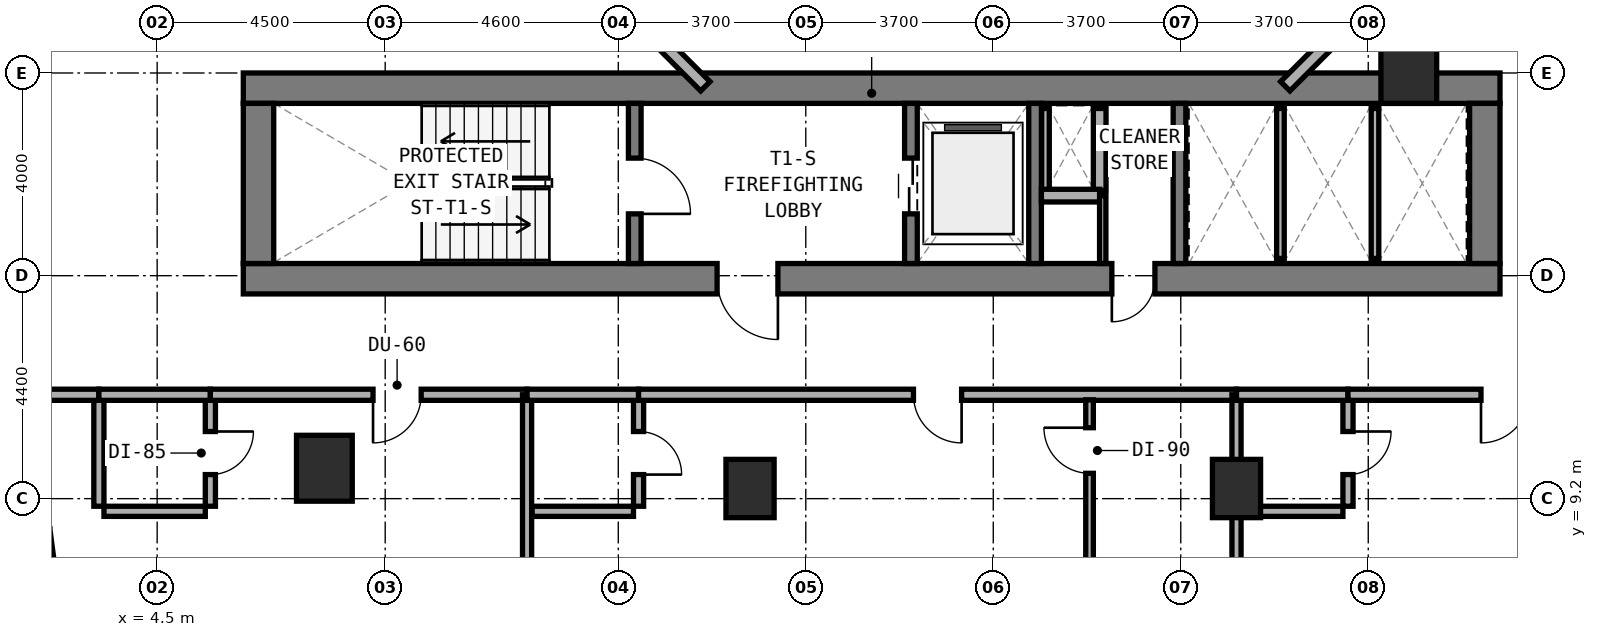
"""IFC4 building model, lengths in metres.
Left out: names, types, materials, properties, quantities, classifications, styles, units other than length and angle.
Written with IfcOpenShell. Run it as: python <this file> out.ifc"""

import sys

from ifc_helpers import new_model, si_unit, direction, frame, frame_2d, origin, origin_2d, place, context, subcontext, project, spatial, rectangle, extrude, element, fill, save


model = new_model("IFC4")
c1 = context("Model", 3, precision=1e-05, world=origin(), true_north=direction((0.0, 1.0)))
c2 = subcontext(c1, "Body", "Model", "MODEL_VIEW")
j1 = project(units=[si_unit("LENGTHUNIT", "METRE"), si_unit("PLANEANGLEUNIT", "RADIAN")], contexts=[c1])
p1 = place(None, origin())
s1 = spatial("IfcSite", under=j1, at=p1, CompositionType="ELEMENT")
p2 = place(p1, origin())
s2 = spatial("IfcBuilding", under=s1, at=p2, CompositionType="ELEMENT")
p3 = place(p2, frame((0.0, 0.0, 48.5)))
s3 = spatial("IfcBuildingStorey", under=s2, at=p3, CompositionType="ELEMENT", Elevation=48.5)
p4 = place(p3, frame((6.2, 13.54, 0.0), z_axis=(0.0, 0.0, 1.0), x_axis=(1.0, 0.0, 0.0)))
e1 = element("IfcWall", 1, at=p4, inside=s3, PredefinedType="SHEAR", context=c2, shape_type="SweptSolid", body=[
    extrude(rectangle(XDim=24.8, YDim=0.6, at=frame_2d((12.4, 0.0))), origin(), (0.0, 0.0, 1.0), 3.5),
])
p5 = place(p4, frame((9.35, 0.0, 0.0)))
e2 = element("IfcOpeningElement", 2, at=p5, cuts=e1, PredefinedType="OPENING", context=c2, shape_type="SweptSolid", body=[
    extrude(rectangle(XDim=1.2, YDim=2.15, at=frame_2d((0.6, 1.075))), frame((0.0, 0.31, 0.0), z_axis=(0.0, -1.0, 0.0), x_axis=(1.0, 0.0, 0.0)), (0.0, 0.0, 1.0), 0.62),
])
p6 = place(p4, frame((17.14, 0.0, 0.0)))
e3 = element("IfcOpeningElement", 3, at=p6, cuts=e1, PredefinedType="OPENING", context=c2, shape_type="SweptSolid", body=[
    extrude(rectangle(XDim=0.85, YDim=2.1, at=frame_2d((0.425, 1.05))), frame((0.0, 0.31, 0.0), z_axis=(0.0, -1.0, 0.0), x_axis=(1.0, 0.0, 0.0)), (0.0, 0.0, 1.0), 0.62),
])
p7 = place(p3, frame((6.2, 17.3, 0.0), z_axis=(0.0, 0.0, 1.0), x_axis=(1.0, 0.0, 0.0)))
e4 = element("IfcWall", 4, at=p7, inside=s3, PredefinedType="SHEAR", context=c2, shape_type="SweptSolid", body=[
    extrude(rectangle(XDim=24.8, YDim=0.6, at=frame_2d((12.4, 0.0))), origin(), (0.0, 0.0, 1.0), 3.5),
])
for number, where, z_axis, x_axis in (
    (5, (6.5, 13.84, 0.0), (0.0, 0.0, 1.0), (0.0, 1.0, 0.0)),
    (6, (30.7, 13.84, 0.0), (0.0, 0.0, 1.0), (0.0, 1.0, 0.0)),
):
    element("IfcWall", number, at=place(p3, frame(where, z_axis=z_axis, x_axis=x_axis)), inside=s3, PredefinedType="SHEAR", context=c2, shape_type="SweptSolid", body=[
        extrude(rectangle(XDim=3.16, YDim=0.6, at=frame_2d((1.58, 0.0))), origin(), (0.0, 0.0, 1.0), 3.5),
    ])
p8 = place(p3, frame((13.925, 13.84, 0.0), z_axis=(0.0, 0.0, 1.0), x_axis=(0.0, 1.0, 0.0)))
e7 = element("IfcWall", 7, at=p8, inside=s3, PredefinedType="STANDARD", context=c2, shape_type="SweptSolid", body=[
    extrude(rectangle(XDim=3.16, YDim=0.25, at=frame_2d((1.58, 0.0))), origin(), (0.0, 0.0, 1.0), 3.22),
])
p9 = place(p8, frame((0.98, 0.0, 0.0)))
e8 = element("IfcOpeningElement", 8, at=p9, cuts=e7, PredefinedType="OPENING", context=c2, shape_type="SweptSolid", body=[
    extrude(rectangle(XDim=1.1, YDim=2.15, at=frame_2d((0.55, 1.075))), frame((0.0, 0.135, 0.0), z_axis=(0.0, -1.0, 0.0), x_axis=(1.0, 0.0, 0.0)), (0.0, 0.0, 1.0), 0.27),
])
p10 = place(p3, frame((19.375, 13.84, 0.0), z_axis=(0.0, 0.0, 1.0), x_axis=(0.0, 1.0, 0.0)))
e9 = element("IfcWall", 9, at=p10, inside=s3, PredefinedType="STANDARD", context=c2, shape_type="SweptSolid", body=[
    extrude(rectangle(XDim=3.16, YDim=0.25, at=frame_2d((1.58, 0.0))), origin(), (0.0, 0.0, 1.0), 3.22),
])
p11 = place(p10, frame((0.98, 0.0, 0.0)))
e10 = element("IfcOpeningElement", 10, at=p11, cuts=e9, PredefinedType="OPENING", context=c2, shape_type="SweptSolid", body=[
    extrude(rectangle(XDim=1.1, YDim=2.15, at=frame_2d((0.55, 1.075))), frame((0.0, 0.135, 0.0), z_axis=(0.0, -1.0, 0.0), x_axis=(1.0, 0.0, 0.0)), (0.0, 0.0, 1.0), 0.27),
])
for number, where, z_axis, x_axis in (
    (11, (21.825, 13.84, 0.0), (0.0, 0.0, 1.0), (0.0, 1.0, 0.0)),
    (12, (24.675, 13.84, 0.0), (0.0, 0.0, 1.0), (0.0, 1.0, 0.0)),
):
    element("IfcWall", number, at=place(p3, frame(where, z_axis=z_axis, x_axis=x_axis)), inside=s3, PredefinedType="STANDARD", context=c2, shape_type="SweptSolid", body=[
        extrude(rectangle(XDim=3.16, YDim=0.25, at=frame_2d((1.58, 0.0))), origin(), (0.0, 0.0, 1.0), 3.22),
    ])
for number, where, z_axis, x_axis in (
    (13, (16.2, 9.4, 0.0), (0.0, 0.0, 1.0), (1.0, 0.0, 0.0)),
    (14, (25.8, 9.4, 0.0), (0.0, 0.0, 1.0), (1.0, 0.0, 0.0)),
):
    element("IfcColumn", number, at=place(p3, frame(where, z_axis=z_axis, x_axis=x_axis)), inside=s3, PredefinedType="COLUMN", context=c2, shape_type="SweptSolid", body=[
        extrude(rectangle(XDim=0.95, YDim=1.15, at=origin_2d()), origin(), (0.0, 0.0, 1.0), 3.5),
    ])
for number, where, z_axis, x_axis in (
    (15, (7.8, 9.8, 0.0), (0.0, 0.0, 1.0), (1.0, 0.0, 0.0)),
    (16, (29.2, 17.65, 0.0), (0.0, 0.0, 1.0), (1.0, 0.0, 0.0)),
):
    element("IfcColumn", number, at=place(p3, frame(where, z_axis=z_axis, x_axis=x_axis)), inside=s3, PredefinedType="COLUMN", context=c2, shape_type="SweptSolid", body=[
        extrude(rectangle(XDim=1.1, YDim=1.3, at=origin_2d()), origin(), (0.0, 0.0, 1.0), 3.5),
    ])
p12 = place(p3, frame((2.228, 8.628, 0.0), z_axis=(0.0, 0.0, 1.0), x_axis=(0.131174864804, -0.991359246108, 0.0)))
e17 = element("IfcWall", 17, at=p12, inside=s3, PredefinedType="STANDARD", context=c2, shape_type="SweptSolid", body=[
    extrude(rectangle(XDim=0.938, YDim=0.3, at=frame_2d((0.469, 0.0))), origin(), (0.0, 0.0, 1.0), 3.22),
])
p13 = place(p3, frame((26.762, 17.338, 0.0), z_axis=(0.0, 0.0, 1.0), x_axis=(0.707059717605, 0.707153841636, 0.0)))
e18 = element("IfcWall", 18, at=p13, inside=s3, PredefinedType="STANDARD", context=c2, shape_type="SweptSolid", body=[
    extrude(rectangle(XDim=2.594, YDim=0.26, at=frame_2d((1.297, 0.0))), origin(), (0.0, 0.0, 1.0), 3.22),
])
p14 = place(p3, frame((13.484, 19.172, 0.0), z_axis=(0.0, 0.0, 1.0), x_axis=(0.707106781187, -0.707106781187, 0.0)))
e19 = element("IfcWall", 19, at=p14, inside=s3, PredefinedType="STANDARD", context=c2, shape_type="SweptSolid", body=[
    extrude(rectangle(XDim=2.594, YDim=0.26, at=frame_2d((1.297, 0.0))), origin(), (0.0, 0.0, 1.0), 3.22),
])
p15 = place(p3, frame((22.03, 15.28, 0.0), z_axis=(0.0, 0.0, 1.0), x_axis=(0.0, 1.0, 0.0)))
e20 = element("IfcWall", 20, at=p15, inside=s3, PredefinedType="PARTITIONING", context=c2, shape_type="SweptSolid", body=[
    extrude(rectangle(XDim=1.62, YDim=0.15, at=frame_2d((0.81, 0.0))), origin(), (0.0, 0.0, 1.0), 3.22),
])
p16 = place(p3, frame((23.1, 15.28, 0.0), z_axis=(0.0, 0.0, 1.0), x_axis=(0.0, 1.0, 0.0)))
e21 = element("IfcWall", 21, at=p16, inside=s3, PredefinedType="SOLIDWALL", context=c2, shape_type="SweptSolid", body=[
    extrude(rectangle(XDim=1.62, YDim=0.25, at=frame_2d((0.81, 0.0))), origin(), (0.0, 0.0, 1.0), 3.22),
])
p17 = place(p3, frame((21.95, 15.18, 0.0), z_axis=(0.0, 0.0, 1.0), x_axis=(1.0, 0.0, 0.0)))
e22 = element("IfcWall", 22, at=p17, inside=s3, PredefinedType="SOLIDWALL", context=c2, shape_type="SweptSolid", body=[
    extrude(rectangle(XDim=1.15, YDim=0.25, at=frame_2d((0.575, 0.0))), origin(), (0.0, 0.0, 1.0), 3.22),
])
p18 = place(p3, frame((23.16, 13.84, 0.0), z_axis=(0.0, 0.0, 1.0), x_axis=(0.0, 1.0, 0.0)))
e23 = element("IfcWall", 23, at=p18, inside=s3, PredefinedType="PARTITIONING", context=c2, shape_type="SweptSolid", body=[
    extrude(rectangle(XDim=1.34, YDim=0.125, at=frame_2d((0.67, 0.0))), origin(), (0.0, 0.0, 1.0), 3.22),
])
p19 = place(p3, frame((26.667, 13.94, 0.0), z_axis=(0.0, 0.0, 1.0), x_axis=(0.0, 1.0, 0.0)))
e24 = element("IfcWall", 24, at=p19, inside=s3, PredefinedType="PARTITIONING", context=c2, shape_type="SweptSolid", body=[
    extrude(rectangle(XDim=2.96, YDim=0.15, at=frame_2d((1.48, 0.0))), origin(), (0.0, 0.0, 1.0), 3.22),
])
p20 = place(p3, frame((28.533, 13.94, 0.0), z_axis=(0.0, 0.0, 1.0), x_axis=(0.0, 1.0, 0.0)))
e25 = element("IfcWall", 25, at=p20, inside=s3, PredefinedType="PARTITIONING", context=c2, shape_type="SweptSolid", body=[
    extrude(rectangle(XDim=2.96, YDim=0.15, at=frame_2d((1.48, 0.0))), origin(), (0.0, 0.0, 1.0), 2.395),
])
p21 = place(p3, frame((5.55, 9.05, 0.0), z_axis=(0.0, 0.0, 1.0), x_axis=(0.0, 1.0, 0.0)))
e26 = element("IfcWall", 26, at=p21, inside=s3, PredefinedType="PLUMBINGWALL", context=c2, shape_type="SweptSolid", body=[
    extrude(rectangle(XDim=2.1, YDim=0.2, at=frame_2d((1.05, 0.0))), origin(), (0.0, 0.0, 1.0), 3.22),
])
p22 = place(p21, frame((0.625, 0.0, 0.0)))
e27 = element("IfcOpeningElement", 27, at=p22, cuts=e26, PredefinedType="OPENING", context=c2, shape_type="SweptSolid", body=[
    extrude(rectangle(XDim=0.85, YDim=2.1, at=frame_2d((0.425, 1.05))), frame((0.0, 0.11, 0.0), z_axis=(0.0, -1.0, 0.0), x_axis=(1.0, 0.0, 0.0)), (0.0, 0.0, 1.0), 0.22),
])
p23 = place(p3, frame((3.45, 8.95, 0.0), z_axis=(0.0, 0.0, 1.0), x_axis=(1.0, 0.0, 0.0)))
e28 = element("IfcWall", 28, at=p23, inside=s3, PredefinedType="PLUMBINGWALL", context=c2, shape_type="SweptSolid", body=[
    extrude(rectangle(XDim=2.0, YDim=0.2, at=frame_2d((1.0, 0.0))), origin(), (0.0, 0.0, 1.0), 3.22),
])
p24 = place(p3, frame((3.35, 9.05, 0.0), z_axis=(0.0, 0.0, 1.0), x_axis=(0.0, 1.0, 0.0)))
e29 = element("IfcWall", 29, at=p24, inside=s3, PredefinedType="PLUMBINGWALL", context=c2, shape_type="SweptSolid", body=[
    extrude(rectangle(XDim=2.1, YDim=0.2, at=frame_2d((1.05, 0.0))), origin(), (0.0, 0.0, 1.0), 3.22),
])
p25 = place(p3, frame((0.24, 11.25, 0.0), z_axis=(0.0, 0.0, 1.0), x_axis=(1.0, 0.0, 0.0)))
e30 = element("IfcWall", 30, at=p25, inside=s3, PredefinedType="SOLIDWALL", context=c2, shape_type="SweptSolid", body=[
    extrude(rectangle(XDim=3.11, YDim=0.22, at=frame_2d((1.555, 0.0))), origin(), (0.0, 0.0, 1.0), 3.22),
])
p26 = place(p3, frame((3.35, 11.25, 0.0), z_axis=(0.0, 0.0, 1.0), x_axis=(1.0, 0.0, 0.0)))
e31 = element("IfcWall", 31, at=p26, inside=s3, PredefinedType="SOLIDWALL", context=c2, shape_type="SweptSolid", body=[
    extrude(rectangle(XDim=2.2, YDim=0.22, at=frame_2d((1.1, 0.0))), origin(), (0.0, 0.0, 1.0), 3.22),
])
p27 = place(p3, frame((5.55, 11.25, 0.0), z_axis=(0.0, 0.0, 1.0), x_axis=(1.0, 0.0, 0.0)))
e32 = element("IfcWall", 32, at=p27, inside=s3, PredefinedType="SOLIDWALL", context=c2, shape_type="SweptSolid", body=[
    extrude(rectangle(XDim=6.25, YDim=0.22, at=frame_2d((3.125, 0.0))), origin(), (0.0, 0.0, 1.0), 2.395),
])
p28 = place(p27, frame((3.21, 0.0, 0.0)))
e33 = element("IfcOpeningElement", 33, at=p28, cuts=e32, PredefinedType="OPENING", context=c2, shape_type="SweptSolid", body=[
    extrude(rectangle(XDim=0.95, YDim=2.1, at=frame_2d((0.475, 1.05))), frame((0.0, 0.12, 0.0), z_axis=(0.0, -1.0, 0.0), x_axis=(1.0, 0.0, 0.0)), (0.0, 0.0, 1.0), 0.24),
])
p29 = place(p3, frame((11.8, 3.712, 0.0), z_axis=(0.0, 0.0, 1.0), x_axis=(0.0, 1.0, 0.0)))
e34 = element("IfcWall", 34, at=p29, inside=s3, PredefinedType="SOLIDWALL", context=c2, shape_type="SweptSolid", body=[
    extrude(rectangle(XDim=7.538, YDim=0.18, at=frame_2d((3.769, 0.0))), origin(), (0.0, 0.0, 1.0), 2.745),
])
p30 = place(p3, frame((14.0, 9.05, 0.0), z_axis=(0.0, 0.0, 1.0), x_axis=(0.0, 1.0, 0.0)))
e35 = element("IfcWall", 35, at=p30, inside=s3, PredefinedType="PLUMBINGWALL", context=c2, shape_type="SweptSolid", body=[
    extrude(rectangle(XDim=2.1, YDim=0.2, at=frame_2d((1.05, 0.0))), origin(), (0.0, 0.0, 1.0), 2.745),
])
p31 = place(p30, frame((0.625, 0.0, 0.0)))
e36 = element("IfcOpeningElement", 36, at=p31, cuts=e35, PredefinedType="OPENING", context=c2, shape_type="SweptSolid", body=[
    extrude(rectangle(XDim=0.85, YDim=2.1, at=frame_2d((0.425, 1.05))), frame((0.0, 0.11, 0.0), z_axis=(0.0, -1.0, 0.0), x_axis=(1.0, 0.0, 0.0)), (0.0, 0.0, 1.0), 0.22),
])
p32 = place(p3, frame((11.9, 8.95, 0.0), z_axis=(0.0, 0.0, 1.0), x_axis=(1.0, 0.0, 0.0)))
e37 = element("IfcWall", 37, at=p32, inside=s3, PredefinedType="PLUMBINGWALL", context=c2, shape_type="SweptSolid", body=[
    extrude(rectangle(XDim=2.0, YDim=0.2, at=frame_2d((1.0, 0.0))), origin(), (0.0, 0.0, 1.0), 3.22),
])
p33 = place(p3, frame((11.8, 11.25, 0.0), z_axis=(0.0, 0.0, 1.0), x_axis=(1.0, 0.0, 0.0)))
e38 = element("IfcWall", 38, at=p33, inside=s3, PredefinedType="SOLIDWALL", context=c2, shape_type="SweptSolid", body=[
    extrude(rectangle(XDim=2.2, YDim=0.22, at=frame_2d((1.1, 0.0))), origin(), (0.0, 0.0, 1.0), 2.955),
])
p34 = place(p3, frame((14.0, 11.25, 0.0), z_axis=(0.0, 0.0, 1.0), x_axis=(1.0, 0.0, 0.0)))
e39 = element("IfcWall", 39, at=p34, inside=s3, PredefinedType="SOLIDWALL", context=c2, shape_type="SweptSolid", body=[
    extrude(rectangle(XDim=11.8, YDim=0.22, at=frame_2d((5.9, 0.0))), origin(), (0.0, 0.0, 1.0), 2.395),
])
p35 = place(p34, frame((5.425, 0.0, 0.0)))
e40 = element("IfcOpeningElement", 40, at=p35, cuts=e39, PredefinedType="OPENING", context=c2, shape_type="SweptSolid", body=[
    extrude(rectangle(XDim=0.95, YDim=2.1, at=frame_2d((0.475, 1.05))), frame((0.0, 0.12, 0.0), z_axis=(0.0, -1.0, 0.0), x_axis=(1.0, 0.0, 0.0)), (0.0, 0.0, 1.0), 0.24),
])
p36 = place(p3, frame((22.9, 3.16, 0.0), z_axis=(0.0, 0.0, 1.0), x_axis=(0.0, 1.0, 0.0)))
e41 = element("IfcWall", 41, at=p36, inside=s3, PredefinedType="PARTITIONING", context=c2, shape_type="SweptSolid", body=[
    extrude(rectangle(XDim=7.99, YDim=0.15, at=frame_2d((3.995, 0.0))), origin(), (0.0, 0.0, 1.0), 2.745),
])
p37 = place(p36, frame((6.54, 0.0, 0.0)))
e42 = element("IfcOpeningElement", 42, at=p37, cuts=e41, PredefinedType="OPENING", context=c2, shape_type="SweptSolid", body=[
    extrude(rectangle(XDim=0.9, YDim=2.1, at=frame_2d((0.45, 1.05))), frame((0.0, 0.085, 0.0), z_axis=(0.0, -1.0, 0.0), x_axis=(1.0, 0.0, 0.0)), (0.0, 0.0, 1.0), 0.17),
])
p38 = place(p3, frame((25.8, 3.06, 0.0), z_axis=(0.0, 0.0, 1.0), x_axis=(0.0, 1.0, 0.0)))
e43 = element("IfcWall", 43, at=p38, inside=s3, PredefinedType="SOLIDWALL", context=c2, shape_type="SweptSolid", body=[
    extrude(rectangle(XDim=8.19, YDim=0.18, at=frame_2d((4.095, 0.0))), origin(), (0.0, 0.0, 1.0), 2.395),
])
p39 = place(p3, frame((28.0, 9.05, 0.0), z_axis=(0.0, 0.0, 1.0), x_axis=(0.0, 1.0, 0.0)))
e44 = element("IfcWall", 44, at=p39, inside=s3, PredefinedType="PLUMBINGWALL", context=c2, shape_type="SweptSolid", body=[
    extrude(rectangle(XDim=2.1, YDim=0.2, at=frame_2d((1.05, 0.0))), origin(), (0.0, 0.0, 1.0), 2.745),
])
p40 = place(p39, frame((0.625, 0.0, 0.0)))
e45 = element("IfcOpeningElement", 45, at=p40, cuts=e44, PredefinedType="OPENING", context=c2, shape_type="SweptSolid", body=[
    extrude(rectangle(XDim=0.85, YDim=2.1, at=frame_2d((0.425, 1.05))), frame((0.0, 0.11, 0.0), z_axis=(0.0, -1.0, 0.0), x_axis=(1.0, 0.0, 0.0)), (0.0, 0.0, 1.0), 0.22),
])
p41 = place(p3, frame((25.9, 8.95, 0.0), z_axis=(0.0, 0.0, 1.0), x_axis=(1.0, 0.0, 0.0)))
e46 = element("IfcWall", 46, at=p41, inside=s3, PredefinedType="PLUMBINGWALL", context=c2, shape_type="SweptSolid", body=[
    extrude(rectangle(XDim=2.0, YDim=0.2, at=frame_2d((1.0, 0.0))), origin(), (0.0, 0.0, 1.0), 3.22),
])
p42 = place(p3, frame((25.8, 11.25, 0.0), z_axis=(0.0, 0.0, 1.0), x_axis=(1.0, 0.0, 0.0)))
e47 = element("IfcWall", 47, at=p42, inside=s3, PredefinedType="SOLIDWALL", context=c2, shape_type="SweptSolid", body=[
    extrude(rectangle(XDim=2.2, YDim=0.22, at=frame_2d((1.1, 0.0))), origin(), (0.0, 0.0, 1.0), 2.395),
])
p43 = place(p3, frame((28.0, 11.25, 0.0), z_axis=(0.0, 0.0, 1.0), x_axis=(1.0, 0.0, 0.0)))
e48 = element("IfcWall", 48, at=p43, inside=s3, PredefinedType="SOLIDWALL", context=c2, shape_type="SweptSolid", body=[
    extrude(rectangle(XDim=6.2, YDim=0.22, at=frame_2d((3.1, 0.0))), origin(), (0.0, 0.0, 1.0), 2.395),
])
p44 = place(p43, frame((2.625, 0.0, 0.0)))
e49 = element("IfcOpeningElement", 49, at=p44, cuts=e48, PredefinedType="OPENING", context=c2, shape_type="SweptSolid", body=[
    extrude(rectangle(XDim=0.95, YDim=2.1, at=frame_2d((0.475, 1.05))), frame((0.0, 0.12, 0.0), z_axis=(0.0, -1.0, 0.0), x_axis=(1.0, 0.0, 0.0)), (0.0, 0.0, 1.0), 0.24),
])
p45 = place(p9, frame((1.1, 0.0, 0.0), z_axis=(0.0, 0.0, 1.0), x_axis=(-1.0, 0.0, 0.0)))
e50 = element("IfcDoor", 50, at=p45, inside=s3, OperationType="SINGLE_SWING_RIGHT", PredefinedType="DOOR", context=c2, shape_type="SweptSolid", body=[
    extrude(rectangle(XDim=1.1, YDim=2.15, at=frame_2d((0.55, 1.075))), frame((0.0, 0.025, 0.0), z_axis=(0.0, -1.0, 0.0), x_axis=(1.0, 0.0, 0.0)), (0.0, 0.0, 1.0), 0.05),
])
fill(e8, e50)
p46 = place(p5, frame((1.2, 0.0, 0.0), z_axis=(0.0, 0.0, 1.0), x_axis=(-1.0, 0.0, 0.0)))
e51 = element("IfcDoor", 51, at=p46, inside=s3, OperationType="SINGLE_SWING_LEFT", PredefinedType="DOOR", context=c2, shape_type="SweptSolid", body=[
    extrude(rectangle(XDim=1.2, YDim=2.15, at=frame_2d((0.6, 1.075))), frame((0.0, 0.025, 0.0), z_axis=(0.0, -1.0, 0.0), x_axis=(1.0, 0.0, 0.0)), (0.0, 0.0, 1.0), 0.05),
])
fill(e2, e51)
p47 = place(p11, origin())
e52 = element("IfcDoor", 52, at=p47, inside=s3, OperationType="DOUBLE_DOOR_SLIDING", PredefinedType="DOOR", context=c2, shape_type="SweptSolid", body=[
    extrude(rectangle(XDim=1.1, YDim=2.15, at=frame_2d((0.55, 1.075))), frame((0.0, 0.025, 0.0), z_axis=(0.0, -1.0, 0.0), x_axis=(1.0, 0.0, 0.0)), (0.0, 0.0, 1.0), 0.05),
])
fill(e10, e52)
p48 = place(p6, frame((0.85, 0.0, 0.0), z_axis=(0.0, 0.0, 1.0), x_axis=(-1.0, 0.0, 0.0)))
e53 = element("IfcDoor", 53, at=p48, inside=s3, OperationType="SINGLE_SWING_RIGHT", PredefinedType="DOOR", context=c2, shape_type="SweptSolid", body=[
    extrude(rectangle(XDim=0.85, YDim=2.1, at=frame_2d((0.425, 1.05))), frame((0.0, 0.025, 0.0), z_axis=(0.0, -1.0, 0.0), x_axis=(1.0, 0.0, 0.0)), (0.0, 0.0, 1.0), 0.05),
])
fill(e3, e53)
p49 = place(p22, frame((0.85, 0.0, 0.0), z_axis=(0.0, 0.0, 1.0), x_axis=(-1.0, 0.0, 0.0)))
e54 = element("IfcDoor", 54, at=p49, inside=s3, OperationType="SINGLE_SWING_LEFT", PredefinedType="DOOR", context=c2, shape_type="SweptSolid", body=[
    extrude(rectangle(XDim=0.85, YDim=2.1, at=frame_2d((0.425, 1.05))), frame((0.0, 0.025, 0.0), z_axis=(0.0, -1.0, 0.0), x_axis=(1.0, 0.0, 0.0)), (0.0, 0.0, 1.0), 0.05),
])
fill(e27, e54)
p50 = place(p28, frame((0.95, 0.0, 0.0), z_axis=(0.0, 0.0, 1.0), x_axis=(-1.0, 0.0, 0.0)))
e55 = element("IfcDoor", 55, at=p50, inside=s3, OperationType="SINGLE_SWING_RIGHT", PredefinedType="DOOR", context=c2, shape_type="SweptSolid", body=[
    extrude(rectangle(XDim=0.95, YDim=2.1, at=frame_2d((0.475, 1.05))), frame((0.0, 0.025, 0.0), z_axis=(0.0, -1.0, 0.0), x_axis=(1.0, 0.0, 0.0)), (0.0, 0.0, 1.0), 0.05),
])
fill(e33, e55)
p51 = place(p31, frame((0.85, 0.0, 0.0), z_axis=(0.0, 0.0, 1.0), x_axis=(-1.0, 0.0, 0.0)))
e56 = element("IfcDoor", 56, at=p51, inside=s3, OperationType="SINGLE_SWING_RIGHT", PredefinedType="DOOR", context=c2, shape_type="SweptSolid", body=[
    extrude(rectangle(XDim=0.85, YDim=2.1, at=frame_2d((0.425, 1.05))), frame((0.0, 0.025, 0.0), z_axis=(0.0, -1.0, 0.0), x_axis=(1.0, 0.0, 0.0)), (0.0, 0.0, 1.0), 0.05),
])
fill(e36, e56)
p52 = place(p35, frame((0.95, 0.0, 0.0), z_axis=(0.0, 0.0, 1.0), x_axis=(-1.0, 0.0, 0.0)))
e57 = element("IfcDoor", 57, at=p52, inside=s3, OperationType="SINGLE_SWING_LEFT", PredefinedType="DOOR", context=c2, shape_type="SweptSolid", body=[
    extrude(rectangle(XDim=0.95, YDim=2.1, at=frame_2d((0.475, 1.05))), frame((0.0, 0.025, 0.0), z_axis=(0.0, -1.0, 0.0), x_axis=(1.0, 0.0, 0.0)), (0.0, 0.0, 1.0), 0.05),
])
fill(e40, e57)
p53 = place(p37, origin())
e58 = element("IfcDoor", 58, at=p53, inside=s3, OperationType="SINGLE_SWING_RIGHT", PredefinedType="DOOR", context=c2, shape_type="SweptSolid", body=[
    extrude(rectangle(XDim=0.9, YDim=2.1, at=frame_2d((0.45, 1.05))), frame((0.0, 0.025, 0.0), z_axis=(0.0, -1.0, 0.0), x_axis=(1.0, 0.0, 0.0)), (0.0, 0.0, 1.0), 0.05),
])
fill(e42, e58)
p54 = place(p40, frame((0.85, 0.0, 0.0), z_axis=(0.0, 0.0, 1.0), x_axis=(-1.0, 0.0, 0.0)))
e59 = element("IfcDoor", 59, at=p54, inside=s3, OperationType="SINGLE_SWING_LEFT", PredefinedType="DOOR", context=c2, shape_type="SweptSolid", body=[
    extrude(rectangle(XDim=0.85, YDim=2.1, at=frame_2d((0.425, 1.05))), frame((0.0, 0.025, 0.0), z_axis=(0.0, -1.0, 0.0), x_axis=(1.0, 0.0, 0.0)), (0.0, 0.0, 1.0), 0.05),
])
fill(e45, e59)
p55 = place(p44, frame((0.95, 0.0, 0.0), z_axis=(0.0, 0.0, 1.0), x_axis=(-1.0, 0.0, 0.0)))
e60 = element("IfcDoor", 60, at=p55, inside=s3, OperationType="SINGLE_SWING_RIGHT", PredefinedType="DOOR", context=c2, shape_type="SweptSolid", body=[
    extrude(rectangle(XDim=0.95, YDim=2.1, at=frame_2d((0.475, 1.05))), frame((0.0, 0.025, 0.0), z_axis=(0.0, -1.0, 0.0), x_axis=(1.0, 0.0, 0.0)), (0.0, 0.0, 1.0), 0.05),
])
fill(e49, e60)
save(model, sys.argv[1])
